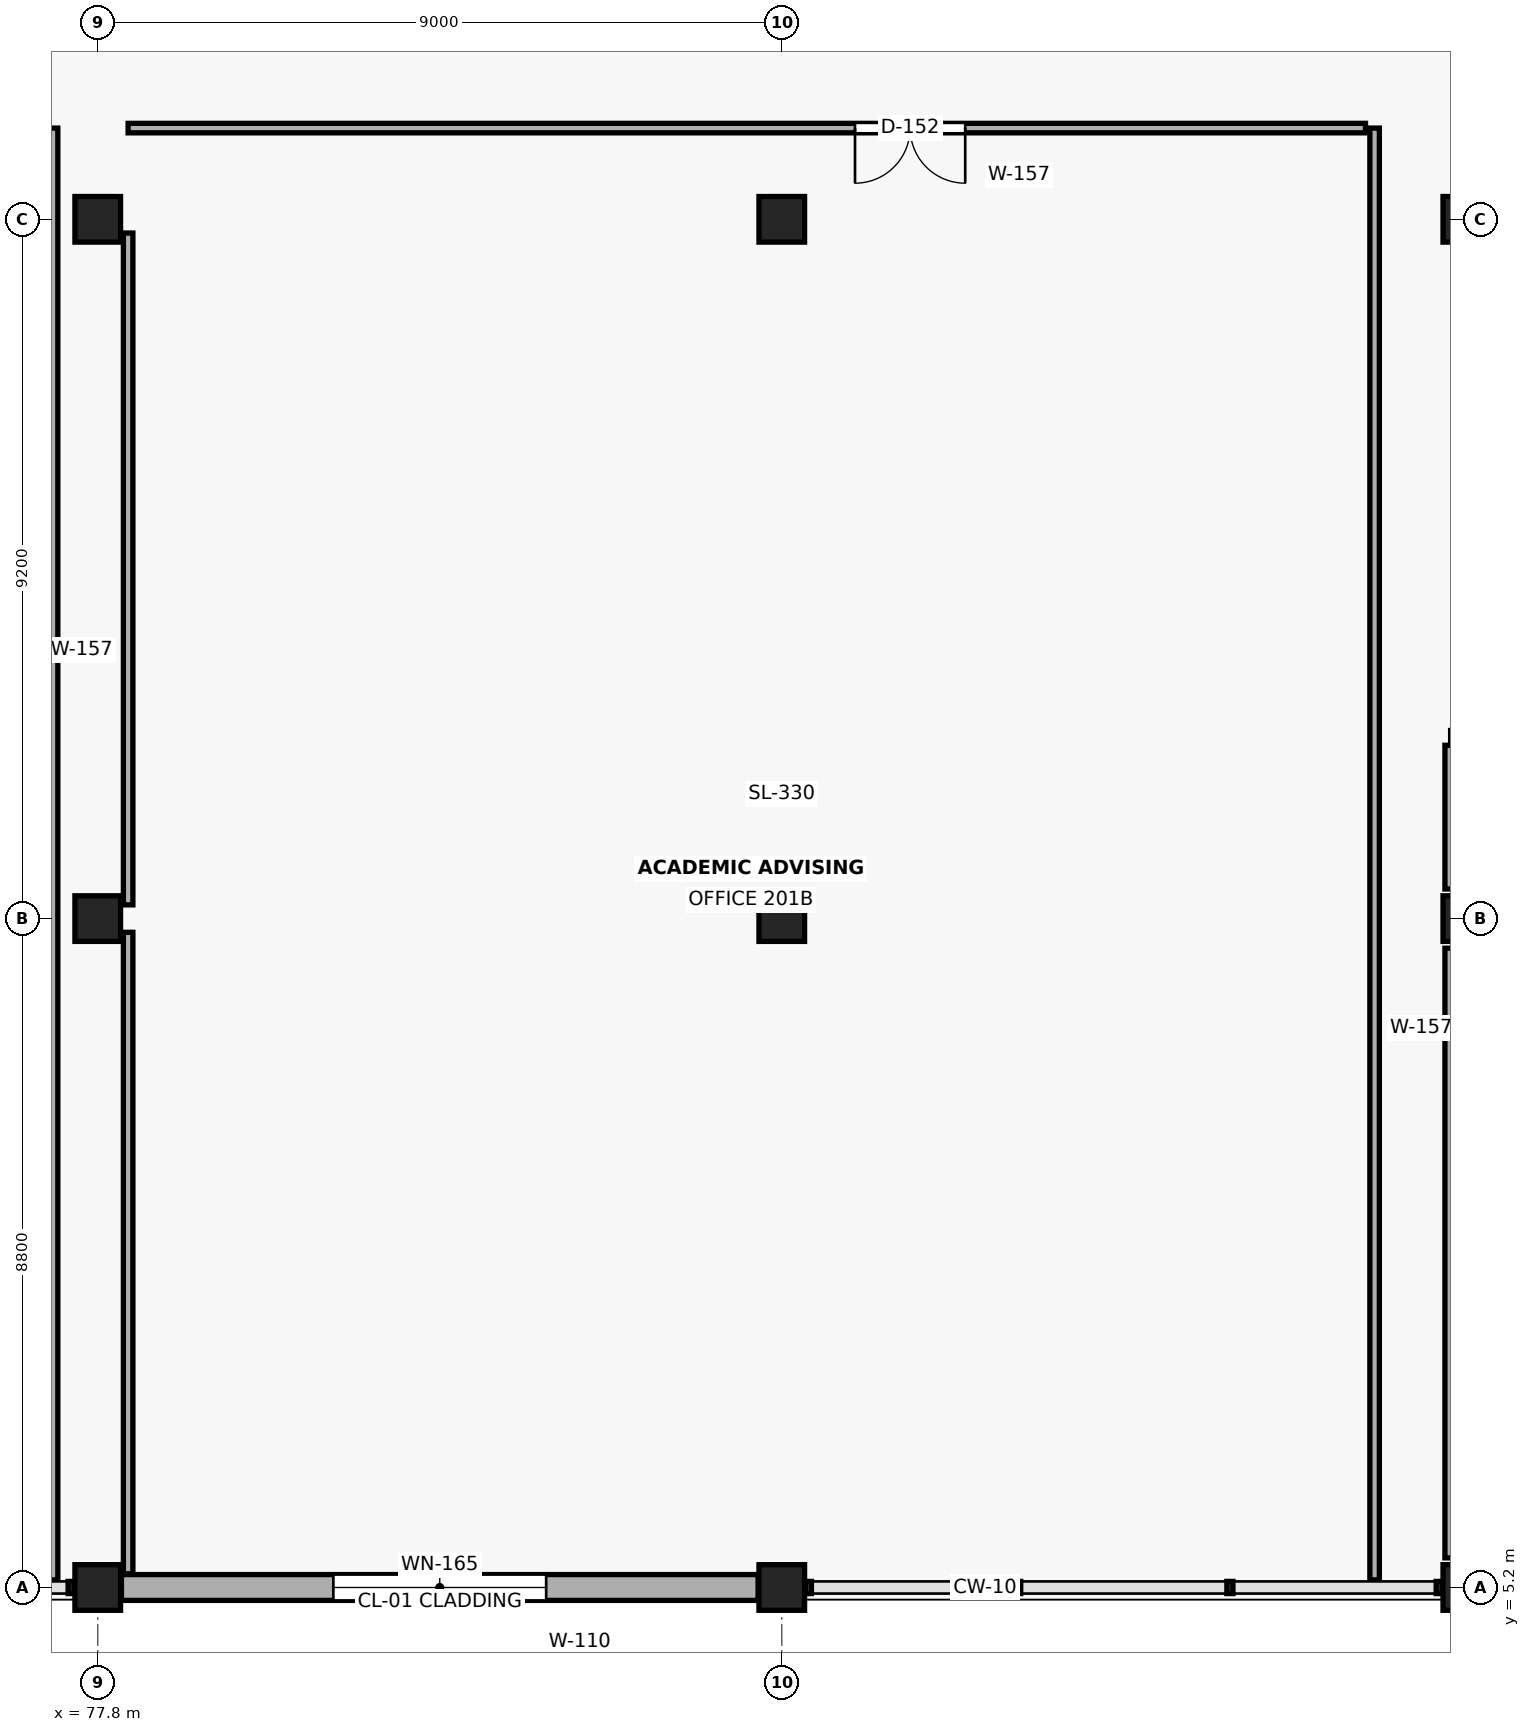
"""IFC4 building model, lengths in metres.
Left out: names, types, materials, properties, quantities, classifications, styles, units other than length and angle.
Written with IfcOpenShell. Run it as: python <this file> out.ifc"""

import sys

from ifc_helpers import new_model, si_unit, direction, frame, frame_2d, origin, origin_2d, place, context, subcontext, project, spatial, rectangle, extrude, element, fill, save


model = new_model("IFC4")
c1 = context("Model", 3, precision=1e-05, world=origin(), true_north=direction((0.0, 1.0)))
c2 = subcontext(c1, "Body", "Model", "MODEL_VIEW")
j1 = project(units=[si_unit("LENGTHUNIT", "METRE"), si_unit("PLANEANGLEUNIT", "RADIAN")], contexts=[c1])
p1 = place(None, origin())
s1 = spatial("IfcSite", under=j1, at=p1, CompositionType="ELEMENT")
p2 = place(p1, origin())
s2 = spatial("IfcBuilding", under=s1, at=p2, CompositionType="ELEMENT")
p3 = place(p2, frame((0.0, 0.0, 9.9)))
s3 = spatial("IfcBuildingStorey", under=s2, at=p3, CompositionType="ELEMENT", Elevation=9.9)
for number, where, z_axis, x_axis in (
    (1, (77.8, 5.2, 0.0), (0.0, 0.0, 1.0), (1.0, 0.0, 0.0)),
    (2, (77.8, 14.0, 0.0), (0.0, 0.0, 1.0), (1.0, 0.0, 0.0)),
    (3, (77.8, 23.2, 0.0), (0.0, 0.0, 1.0), (1.0, 0.0, 0.0)),
    (4, (86.8, 5.2, 0.0), (0.0, 0.0, 1.0), (1.0, 0.0, 0.0)),
    (5, (86.8, 14.0, 0.0), (0.0, 0.0, 1.0), (1.0, 0.0, 0.0)),
    (6, (86.8, 23.2, 0.0), (0.0, 0.0, 1.0), (1.0, 0.0, 0.0)),
    (7, (95.8, 5.2, 0.0), (0.0, 0.0, 1.0), (1.0, 0.0, 0.0)),
    (8, (95.8, 14.0, 0.0), (0.0, 0.0, 1.0), (1.0, 0.0, 0.0)),
    (9, (95.8, 23.2, 0.0), (0.0, 0.0, 1.0), (1.0, 0.0, 0.0)),
):
    element("IfcColumn", number, at=place(p3, frame(where, z_axis=z_axis, x_axis=x_axis)), inside=s3, PredefinedType="COLUMN", context=c2, shape_type="SweptSolid", body=[
        extrude(rectangle(XDim=0.6, YDim=0.6, at=origin_2d()), origin(), (0.0, 0.0, 1.0), 4.5),
    ])
p4 = place(p3, frame((86.488, 5.2, 0.0), z_axis=(0.0, 0.0, 1.0), x_axis=(-1.0, 0.0, 0.0)))
e10 = element("IfcWall", 10, at=p4, inside=s3, PredefinedType="SOLIDWALL", context=c2, shape_type="SweptSolid", body=[
    extrude(rectangle(XDim=8.376, YDim=0.34, at=frame_2d((4.188, 0.0))), origin(), (0.0, 0.0, 1.0), 3.395),
])
p5 = place(p4, frame((2.788, 0.0, 0.85)))
e11 = element("IfcOpeningElement", 11, at=p5, cuts=e10, PredefinedType="OPENING", context=c2, shape_type="SweptSolid", body=[
    extrude(rectangle(XDim=2.8, YDim=2.45, at=frame_2d((1.4, 1.225))), frame((0.0, 0.182, 0.0), z_axis=(0.0, -1.0, 0.0), x_axis=(1.0, 0.0, 0.0)), (0.0, 0.0, 1.0), 0.364),
])
p6 = place(p3, frame((77.2, 5.3, 0.0), z_axis=(0.0, 0.0, 1.0), x_axis=(0.0, 1.0, 0.0)))
e12 = element("IfcWall", 12, at=p6, inside=s3, PredefinedType="PARTITIONING", context=c2, shape_type="SweptSolid", body=[
    extrude(rectangle(XDim=19.1, YDim=0.15, at=frame_2d((9.55, 0.0))), origin(), (0.0, 0.0, 1.0), 4.255),
])
p7 = place(p3, frame((94.6, 5.3, 0.0), z_axis=(0.0, 0.0, 1.0), x_axis=(0.0, 1.0, 0.0)))
e13 = element("IfcWall", 13, at=p7, inside=s3, PredefinedType="PARTITIONING", context=c2, shape_type="SweptSolid", body=[
    extrude(rectangle(XDim=19.1, YDim=0.125, at=frame_2d((9.55, 0.0))), origin(), (0.0, 0.0, 1.0), 4.255),
])
p8 = place(p3, frame((94.48, 24.4, 0.0), z_axis=(0.0, 0.0, 1.0), x_axis=(-1.0, 0.0, 0.0)))
e14 = element("IfcWall", 14, at=p8, inside=s3, PredefinedType="PARTITIONING", context=c2, shape_type="SweptSolid", body=[
    extrude(rectangle(XDim=16.28, YDim=0.125, at=frame_2d((8.14, 0.0))), origin(), (0.0, 0.0, 1.0), 4.255),
])
p9 = place(p8, frame((5.267, 0.0, 0.0)))
e15 = element("IfcOpeningElement", 15, at=p9, cuts=e14, PredefinedType="OPENING", context=c2, shape_type="SweptSolid", body=[
    extrude(rectangle(XDim=1.45, YDim=2.35, at=frame_2d((0.725, 1.175))), frame((0.0, 0.074, 0.0), z_axis=(0.0, -1.0, 0.0), x_axis=(1.0, 0.0, 0.0)), (0.0, 0.0, 1.0), 0.149),
])
p10 = place(p3, frame((78.2, 23.02, 0.0), z_axis=(0.0, 0.0, 1.0), x_axis=(0.0, -1.0, 0.0)))
e16 = element("IfcWall", 16, at=p10, inside=s3, PredefinedType="PARTITIONING", context=c2, shape_type="SweptSolid", body=[
    extrude(rectangle(XDim=8.839, YDim=0.125, at=frame_2d((4.419, 0.0))), origin(), (0.0, 0.0, 1.0), 4.255),
])
p11 = place(p3, frame((78.2, 13.819, 0.0), z_axis=(0.0, 0.0, 1.0), x_axis=(0.0, -1.0, 0.0)))
e17 = element("IfcWall", 17, at=p11, inside=s3, PredefinedType="PARTITIONING", context=c2, shape_type="SweptSolid", body=[
    extrude(rectangle(XDim=8.439, YDim=0.125, at=frame_2d((4.219, 0.0))), origin(), (0.0, 0.0, 1.0), 4.255),
])
p12 = place(p3, frame((114.05, 16.4, 0.0), z_axis=(0.0, 0.0, 1.0), x_axis=(-1.0, 0.0, 0.0)))
e18 = element("IfcWall", 18, at=p12, inside=s3, PredefinedType="PARTITIONING", context=c2, shape_type="SweptSolid", body=[
    extrude(rectangle(XDim=18.45, YDim=0.15, at=frame_2d((9.225, 0.0))), origin(), (0.0, 0.0, 1.0), 4.255),
])
p13 = place(p12, frame((6.26, 0.0, 0.0)))
e19 = element("IfcOpeningElement", 19, at=p13, cuts=e18, PredefinedType="OPENING", context=c2, shape_type="SweptSolid", body=[
    extrude(rectangle(XDim=1.1, YDim=2.25, at=frame_2d((0.55, 1.125))), frame((0.0, 0.087, 0.0), z_axis=(0.0, -1.0, 0.0), x_axis=(1.0, 0.0, 0.0)), (0.0, 0.0, 1.0), 0.174),
])
p14 = place(p3, frame((95.6, 16.28, 0.0), z_axis=(0.0, 0.0, 1.0), x_axis=(0.0, -1.0, 0.0)))
e20 = element("IfcWall", 20, at=p14, inside=s3, PredefinedType="PARTITIONING", context=c2, shape_type="SweptSolid", body=[
    extrude(rectangle(XDim=1.89, YDim=0.15, at=frame_2d((0.945, 0.0))), origin(), (0.0, 0.0, 1.0), 3.555),
])
p15 = place(p3, frame((95.6, 13.61, 0.0), z_axis=(0.0, 0.0, 1.0), x_axis=(0.0, -1.0, 0.0)))
e21 = element("IfcWall", 21, at=p15, inside=s3, PredefinedType="PARTITIONING", context=c2, shape_type="SweptSolid", body=[
    extrude(rectangle(XDim=8.021, YDim=0.15, at=frame_2d((4.01, 0.0))), origin(), (0.0, 0.0, 1.0), 3.555),
])
p16 = place(p5, origin())
e22 = element("IfcWindow", 22, at=p16, inside=s3, PartitioningType="SINGLE_PANEL", PredefinedType="WINDOW", context=c2, shape_type="SweptSolid", body=[
    extrude(rectangle(XDim=2.8, YDim=2.45, at=frame_2d((1.4, 1.225))), frame((0.0, 0.03, 0.0), z_axis=(0.0, -1.0, 0.0), x_axis=(1.0, 0.0, 0.0)), (0.0, 0.0, 1.0), 0.06),
])
fill(e11, e22)
p17 = place(p9, origin())
e23 = element("IfcDoor", 23, at=p17, inside=s3, OperationType="DOUBLE_DOOR_SINGLE_SWING", PredefinedType="DOOR", context=c2, shape_type="SweptSolid", body=[
    extrude(rectangle(XDim=1.45, YDim=2.35, at=frame_2d((0.725, 1.175))), frame((0.0, 0.025, 0.0), z_axis=(0.0, -1.0, 0.0), x_axis=(1.0, 0.0, 0.0)), (0.0, 0.0, 1.0), 0.05),
])
fill(e15, e23)
save(model, sys.argv[1])
